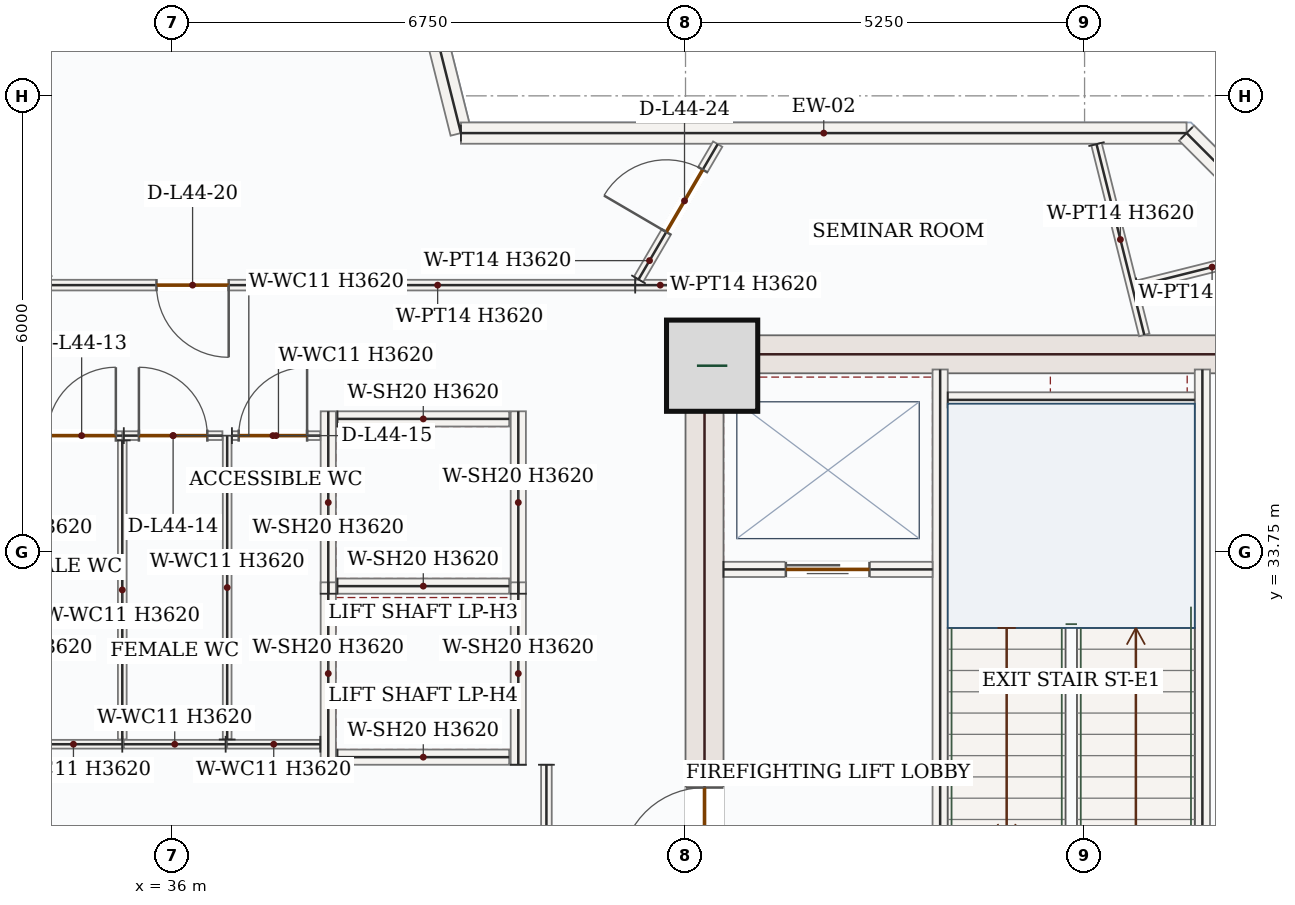
"""IFC4 building model, lengths in metres.
Left out: names, types, materials, properties, quantities, classifications, styles, units other than length and angle.
Written with IfcOpenShell. Run it as: python <this file> out.ifc"""

import sys

from ifc_helpers import new_model, si_unit, direction, frame, frame_2d, origin, origin_2d, place, context, subcontext, project, spatial, rectangle, extrude, source, transform, mapped, element, fill, save


model = new_model("IFC4")
c1 = context("Model", 3, precision=1e-05, world=origin(), true_north=direction((0.0, 1.0)))
c2 = subcontext(c1, "Body", "Model", "MODEL_VIEW")
j1 = project(units=[si_unit("LENGTHUNIT", "METRE"), si_unit("PLANEANGLEUNIT", "RADIAN")], contexts=[c1])
p1 = place(None, origin())
s1 = spatial("IfcSite", under=j1, at=p1, CompositionType="ELEMENT")
p2 = place(p1, origin())
s2 = spatial("IfcBuilding", under=s1, at=p2, CompositionType="ELEMENT")
p3 = place(p2, frame((0.0, 0.0, 190.2)))
s3 = spatial("IfcBuildingStorey", under=s2, at=p3, CompositionType="ELEMENT", Elevation=190.2)
p4 = place(p3, frame((43.0, 28.05, 0.0), z_axis=(0.0, 0.0, 1.0), x_axis=(0.0, 1.0, 0.0)))
e1 = element("IfcWall", 1, at=p4, inside=s3, PredefinedType="SHEAR", context=c2, shape_type="SweptSolid", body=[
    extrude(rectangle(XDim=8.55, YDim=0.5, at=frame_2d((4.275, 0.0))), origin(), (0.0, 0.0, 1.0), 3.62),
])
p5 = place(p4, frame((1.5, 0.0, 0.0)))
e2 = element("IfcOpeningElement", 2, at=p5, cuts=e1, PredefinedType="OPENING", context=c2, shape_type="SweptSolid", body=[
    extrude(rectangle(XDim=1.1, YDim=2.2, at=frame_2d((0.55, 1.1))), frame((0.0, 0.26, 0.0), z_axis=(0.0, -1.0, 0.0), x_axis=(1.0, 0.0, 0.0)), (0.0, 0.0, 1.0), 0.52),
])
m1 = source(origin(), c2, "Body", "SweptSolid", [
    extrude(rectangle(XDim=7.0, YDim=0.5, at=frame_2d((3.5, 0.0))), origin(), (0.0, 0.0, 1.0), 3.62),
])
p6 = place(p3, frame((43.25, 36.35, 0.0), z_axis=(0.0, 0.0, 1.0), x_axis=(1.0, 0.0, 0.0)))
e3 = element("IfcWall", 3, at=p6, inside=s3, PredefinedType="SHEAR", context=c2, shape_type="MappedRepresentation", body=[
    mapped(m1, transform((0.0, 0.0, 0.0), x_axis=(1.0, 0.0, 0.0), y_axis=(0.0, 1.0, 0.0), z_axis=(0.0, 0.0, 1.0), scale=1.0)),
])
m2 = source(origin(), c2, "Body", "SweptSolid", [
    extrude(rectangle(XDim=1.2, YDim=1.2, at=origin_2d()), origin(), (0.0, 0.0, 1.0), 3.9),
])
p7 = place(p3, frame((43.1, 36.2, 0.0), z_axis=(0.0, 0.0, 1.0), x_axis=(1.0, 0.0, 0.0)))
e4 = element("IfcColumn", 4, at=p7, inside=s3, PredefinedType="COLUMN", context=c2, shape_type="MappedRepresentation", body=[
    mapped(m2, transform((0.0, 0.0, 0.0), x_axis=(1.0, 0.0, 0.0), y_axis=(0.0, 1.0, 0.0), z_axis=(0.0, 0.0, 1.0), scale=1.0)),
])
m3 = source(origin(), c2, "Body", "SweptSolid", [
    extrude(rectangle(XDim=8.389, YDim=0.28, at=frame_2d((4.195, 0.0))), origin(), (0.0, 0.0, 1.0), 3.62),
])
p8 = place(p3, frame((37.757, 47.398, 0.0), z_axis=(0.0, 0.0, 1.0), x_axis=(0.242939601766, -0.970041416587, 0.0)))
e5 = element("IfcWall", 5, at=p8, inside=s3, PredefinedType="SOLIDWALL", context=c2, shape_type="MappedRepresentation", body=[
    mapped(m3, transform((0.0, 0.0, 0.0), x_axis=(1.0, 0.0, 0.0), y_axis=(0.0, 1.0, 0.0), z_axis=(0.0, 0.0, 1.0), scale=1.0)),
])
m4 = source(origin(), c2, "Body", "SweptSolid", [
    extrude(rectangle(XDim=9.547, YDim=0.28, at=frame_2d((4.773, 0.0))), origin(), (0.0, 0.0, 1.0), 3.62),
])
p9 = place(p3, frame((39.795, 39.26, 0.0), z_axis=(0.0, 0.0, 1.0), x_axis=(1.0, 0.0, 0.0)))
e6 = element("IfcWall", 6, at=p9, inside=s3, PredefinedType="SOLIDWALL", context=c2, shape_type="MappedRepresentation", body=[
    mapped(m4, transform((0.0, 0.0, 0.0), x_axis=(1.0, 0.0, 0.0), y_axis=(0.0, 1.0, 0.0), z_axis=(0.0, 0.0, 1.0), scale=1.0)),
])
m5 = source(origin(), c2, "Body", "SweptSolid", [
    extrude(rectangle(XDim=2.322, YDim=0.28, at=frame_2d((1.161, 0.0))), origin(), (0.0, 0.0, 1.0), 3.62),
])
p10 = place(p3, frame((49.342, 39.26, 0.0), z_axis=(0.0, 0.0, 1.0), x_axis=(0.707106781187, -0.707106781187, 0.0)))
e7 = element("IfcWall", 7, at=p10, inside=s3, PredefinedType="SOLIDWALL", context=c2, shape_type="MappedRepresentation", body=[
    mapped(m5, transform((0.0, 0.0, 0.0), x_axis=(1.0, 0.0, 0.0), y_axis=(0.0, 1.0, 0.0), z_axis=(0.0, 0.0, 1.0), scale=1.0)),
])
m6 = source(origin(), c2, "Body", "SweptSolid", [
    extrude(rectangle(XDim=7.87, YDim=0.2, at=frame_2d((3.935, 0.0))), origin(), (0.0, 0.0, 1.0), 3.62),
])
p11 = place(p3, frame((49.55, 28.28, 0.0), z_axis=(0.0, 0.0, 1.0), x_axis=(0.0, 1.0, 0.0)))
e8 = element("IfcWall", 8, at=p11, inside=s3, PredefinedType="SOLIDWALL", context=c2, shape_type="MappedRepresentation", body=[
    mapped(m6, transform((0.0, 0.0, 0.0), x_axis=(1.0, 0.0, 0.0), y_axis=(0.0, 1.0, 0.0), z_axis=(0.0, 0.0, 1.0), scale=1.0)),
])
p12 = place(p3, frame((46.1, 28.15, 0.0), z_axis=(0.0, 0.0, 1.0), x_axis=(0.0, 1.0, 0.0)))
e9 = element("IfcWall", 9, at=p12, inside=s3, PredefinedType="SOLIDWALL", context=c2, shape_type="SweptSolid", body=[
    extrude(rectangle(XDim=8.0, YDim=0.2, at=frame_2d((4.0, 0.0))), origin(), (0.0, 0.0, 1.0), 3.62),
])
p13 = place(p12, frame((0.4, 0.0, 0.0)))
e10 = element("IfcOpeningElement", 10, at=p13, cuts=e9, PredefinedType="OPENING", context=c2, shape_type="SweptSolid", body=[
    extrude(rectangle(XDim=1.05, YDim=2.15, at=frame_2d((0.525, 1.075))), frame((0.0, 0.11, 0.0), z_axis=(0.0, -1.0, 0.0), x_axis=(1.0, 0.0, 0.0)), (0.0, 0.0, 1.0), 0.22),
])
m7 = source(origin(), c2, "Body", "SweptSolid", [
    extrude(rectangle(XDim=3.25, YDim=0.2, at=frame_2d((1.625, 0.0))), origin(), (0.0, 0.0, 1.0), 3.62),
])
p14 = place(p3, frame((46.2, 35.75, 0.0), z_axis=(0.0, 0.0, 1.0), x_axis=(1.0, 0.0, 0.0)))
e11 = element("IfcWall", 11, at=p14, inside=s3, PredefinedType="SOLIDWALL", context=c2, shape_type="MappedRepresentation", body=[
    mapped(m7, transform((0.0, 0.0, 0.0), x_axis=(1.0, 0.0, 0.0), y_axis=(0.0, 1.0, 0.0), z_axis=(0.0, 0.0, 1.0), scale=1.0)),
])
p15 = place(p3, frame((43.25, 33.52, 0.0), z_axis=(0.0, 0.0, 1.0), x_axis=(1.0, 0.0, 0.0)))
e12 = element("IfcWall", 12, at=p15, inside=s3, PredefinedType="SOLIDWALL", context=c2, shape_type="SweptSolid", body=[
    extrude(rectangle(XDim=2.75, YDim=0.2, at=frame_2d((1.375, 0.0))), origin(), (0.0, 0.0, 1.0), 3.62),
])
p16 = place(p15, frame((0.82, 0.0, 0.0)))
e13 = element("IfcOpeningElement", 13, at=p16, cuts=e12, PredefinedType="OPENING", context=c2, shape_type="SweptSolid", body=[
    extrude(rectangle(XDim=1.1, YDim=2.15, at=frame_2d((0.55, 1.075))), frame((0.0, 0.11, 0.0), z_axis=(0.0, -1.0, 0.0), x_axis=(1.0, 0.0, 0.0)), (0.0, 0.0, 1.0), 0.22),
])
m8 = source(origin(), c2, "Body", "SweptSolid", [
    extrude(rectangle(XDim=2.4, YDim=0.2, at=frame_2d((1.2, 0.0))), origin(), (0.0, 0.0, 1.0), 3.62),
])
for number, where, z_axis, x_axis in (
    (14, (38.05, 33.2, 0.0), (0.0, 0.0, 1.0), (0.0, 1.0, 0.0)),
    (15, (40.55, 33.2, 0.0), (0.0, 0.0, 1.0), (0.0, 1.0, 0.0)),
):
    element("IfcWall", number, at=place(p3, frame(where, z_axis=z_axis, x_axis=x_axis)), inside=s3, PredefinedType="SOLIDWALL", context=c2, shape_type="MappedRepresentation", body=[
        mapped(m8, transform((0.0, 0.0, 0.0), x_axis=(1.0, 0.0, 0.0), y_axis=(0.0, 1.0, 0.0), z_axis=(0.0, 0.0, 1.0), scale=1.0)),
    ])
m9 = source(origin(), c2, "Body", "SweptSolid", [
    extrude(rectangle(XDim=2.26, YDim=0.2, at=frame_2d((1.13, 0.0))), origin(), (0.0, 0.0, 1.0), 3.62),
])
for number, where, z_axis, x_axis in (
    (16, (38.17, 33.3, 0.0), (0.0, 0.0, 1.0), (1.0, 0.0, 0.0)),
    (17, (38.17, 35.5, 0.0), (0.0, 0.0, 1.0), (1.0, 0.0, 0.0)),
):
    element("IfcWall", number, at=place(p3, frame(where, z_axis=z_axis, x_axis=x_axis)), inside=s3, PredefinedType="SOLIDWALL", context=c2, shape_type="MappedRepresentation", body=[
        mapped(m9, transform((0.0, 0.0, 0.0), x_axis=(1.0, 0.0, 0.0), y_axis=(0.0, 1.0, 0.0), z_axis=(0.0, 0.0, 1.0), scale=1.0)),
    ])
for number, where, z_axis, x_axis in (
    (18, (38.05, 30.95, 0.0), (0.0, 0.0, 1.0), (0.0, 1.0, 0.0)),
    (19, (40.55, 30.95, 0.0), (0.0, 0.0, 1.0), (0.0, 1.0, 0.0)),
):
    element("IfcWall", number, at=place(p3, frame(where, z_axis=z_axis, x_axis=x_axis)), inside=s3, PredefinedType="SOLIDWALL", context=c2, shape_type="MappedRepresentation", body=[
        mapped(m8, transform((0.0, 0.0, 0.0), x_axis=(1.0, 0.0, 0.0), y_axis=(0.0, 1.0, 0.0), z_axis=(0.0, 0.0, 1.0), scale=1.0)),
    ])
p17 = place(p3, frame((38.17, 31.05, 0.0), z_axis=(0.0, 0.0, 1.0), x_axis=(1.0, 0.0, 0.0)))
e20 = element("IfcWall", 20, at=p17, inside=s3, PredefinedType="SOLIDWALL", context=c2, shape_type="MappedRepresentation", body=[
    mapped(m9, transform((0.0, 0.0, 0.0), x_axis=(1.0, 0.0, 0.0), y_axis=(0.0, 1.0, 0.0), z_axis=(0.0, 0.0, 1.0), scale=1.0)),
])
m10 = source(origin(), c2, "Body", "SweptSolid", [
    extrude(rectangle(XDim=1.225, YDim=0.115, at=frame_2d((0.613, 0.0))), origin(), (0.0, 0.0, 1.0), 3.62),
])
p18 = place(p3, frame((37.945, 31.22, 0.0), z_axis=(0.0, 0.0, 1.0), x_axis=(-1.0, 0.0, 0.0)))
e21 = element("IfcWall", 21, at=p18, inside=s3, PredefinedType="PARTITIONING", context=c2, shape_type="MappedRepresentation", body=[
    mapped(m10, transform((0.0, 0.0, 0.0), x_axis=(1.0, 0.0, 0.0), y_axis=(0.0, 1.0, 0.0), z_axis=(0.0, 0.0, 1.0), scale=1.0)),
])
m11 = source(origin(), c2, "Body", "SweptSolid", [
    extrude(rectangle(XDim=3.998, YDim=0.115, at=frame_2d((1.999, 0.0))), origin(), (0.0, 0.0, 1.0), 3.62),
])
p19 = place(p3, frame((36.72, 31.282, 0.0), z_axis=(0.0, 0.0, 1.0), x_axis=(0.0, 1.0, 0.0)))
e22 = element("IfcWall", 22, at=p19, inside=s3, PredefinedType="PARTITIONING", context=c2, shape_type="MappedRepresentation", body=[
    mapped(m11, transform((0.0, 0.0, 0.0), x_axis=(1.0, 0.0, 0.0), y_axis=(0.0, 1.0, 0.0), z_axis=(0.0, 0.0, 1.0), scale=1.0)),
])
p20 = place(p3, frame((36.782, 35.28, 0.0), z_axis=(0.0, 0.0, 1.0), x_axis=(1.0, 0.0, 0.0)))
e23 = element("IfcWall", 23, at=p20, inside=s3, PredefinedType="PARTITIONING", context=c2, shape_type="SweptSolid", body=[
    extrude(rectangle(XDim=1.163, YDim=0.115, at=frame_2d((0.581, 0.0))), origin(), (0.0, 0.0, 1.0), 3.62),
])
p21 = place(p20, frame((0.089, 0.0, 0.0)))
e24 = element("IfcOpeningElement", 24, at=p21, cuts=e23, PredefinedType="OPENING", context=c2, shape_type="SweptSolid", body=[
    extrude(rectangle(XDim=0.9, YDim=2.1, at=frame_2d((0.45, 1.05))), frame((0.0, 0.067, 0.0), z_axis=(0.0, -1.0, 0.0), x_axis=(1.0, 0.0, 0.0)), (0.0, 0.0, 1.0), 0.135),
])
m12 = source(origin(), c2, "Body", "SweptSolid", [
    extrude(rectangle(XDim=1.285, YDim=0.115, at=frame_2d((0.643, 0.0))), origin(), (0.0, 0.0, 1.0), 3.62),
])
p22 = place(p3, frame((35.34, 31.22, 0.0), z_axis=(0.0, 0.0, 1.0), x_axis=(-1.0, 0.0, 0.0)))
e25 = element("IfcWall", 25, at=p22, inside=s3, PredefinedType="PARTITIONING", context=c2, shape_type="MappedRepresentation", body=[
    mapped(m12, transform((0.0, 0.0, 0.0), x_axis=(1.0, 0.0, 0.0), y_axis=(0.0, 1.0, 0.0), z_axis=(0.0, 0.0, 1.0), scale=1.0)),
])
p23 = place(p3, frame((34.055, 35.28, 0.0), z_axis=(0.0, 0.0, 1.0), x_axis=(1.0, 0.0, 0.0)))
e26 = element("IfcWall", 26, at=p23, inside=s3, PredefinedType="PARTITIONING", context=c2, shape_type="SweptSolid", body=[
    extrude(rectangle(XDim=1.285, YDim=0.115, at=frame_2d((0.643, 0.0))), origin(), (0.0, 0.0, 1.0), 3.62),
])
p24 = place(p23, frame((0.3, 0.0, 0.0)))
e27 = element("IfcOpeningElement", 27, at=p24, cuts=e26, PredefinedType="OPENING", context=c2, shape_type="SweptSolid", body=[
    extrude(rectangle(XDim=0.9, YDim=2.1, at=frame_2d((0.45, 1.05))), frame((0.0, 0.067, 0.0), z_axis=(0.0, -1.0, 0.0), x_axis=(1.0, 0.0, 0.0)), (0.0, 0.0, 1.0), 0.135),
])
m13 = source(origin(), c2, "Body", "SweptSolid", [
    extrude(rectangle(XDim=3.935, YDim=0.115, at=frame_2d((1.968, 0.0))), origin(), (0.0, 0.0, 1.0), 3.62),
])
p25 = place(p3, frame((35.34, 35.218, 0.0), z_axis=(0.0, 0.0, 1.0), x_axis=(0.0, -1.0, 0.0)))
e28 = element("IfcWall", 28, at=p25, inside=s3, PredefinedType="PARTITIONING", context=c2, shape_type="MappedRepresentation", body=[
    mapped(m13, transform((0.0, 0.0, 0.0), x_axis=(1.0, 0.0, 0.0), y_axis=(0.0, 1.0, 0.0), z_axis=(0.0, 0.0, 1.0), scale=1.0)),
])
m14 = source(origin(), c2, "Body", "SweptSolid", [
    extrude(rectangle(XDim=1.34, YDim=0.115, at=frame_2d((0.67, 0.0))), origin(), (0.0, 0.0, 1.0), 3.62),
])
p26 = place(p3, frame((36.7, 31.22, 0.0), z_axis=(0.0, 0.0, 1.0), x_axis=(-1.0, 0.0, 0.0)))
e29 = element("IfcWall", 29, at=p26, inside=s3, PredefinedType="PARTITIONING", context=c2, shape_type="MappedRepresentation", body=[
    mapped(m14, transform((0.0, 0.0, 0.0), x_axis=(1.0, 0.0, 0.0), y_axis=(0.0, 1.0, 0.0), z_axis=(0.0, 0.0, 1.0), scale=1.0)),
])
p27 = place(p3, frame((35.36, 35.28, 0.0), z_axis=(0.0, 0.0, 1.0), x_axis=(1.0, 0.0, 0.0)))
e30 = element("IfcWall", 30, at=p27, inside=s3, PredefinedType="PARTITIONING", context=c2, shape_type="SweptSolid", body=[
    extrude(rectangle(XDim=1.297, YDim=0.115, at=frame_2d((0.649, 0.0))), origin(), (0.0, 0.0, 1.0), 3.62),
])
p28 = place(p27, frame((0.199, 0.0, 0.0)))
e31 = element("IfcOpeningElement", 31, at=p28, cuts=e30, PredefinedType="OPENING", context=c2, shape_type="SweptSolid", body=[
    extrude(rectangle(XDim=0.9, YDim=2.1, at=frame_2d((0.45, 1.05))), frame((0.0, 0.067, 0.0), z_axis=(0.0, -1.0, 0.0), x_axis=(1.0, 0.0, 0.0)), (0.0, 0.0, 1.0), 0.135),
])
m15 = source(origin(), c2, "Body", "SweptSolid", [
    extrude(rectangle(XDim=0.66, YDim=0.14, at=frame_2d((0.33, 0.0))), origin(), (0.0, 0.0, 1.0), 3.62),
])
p29 = place(p3, frame((42.748, 37.259, 0.0), z_axis=(0.0, 0.0, 1.0), x_axis=(-0.99999938363, 0.001110287991, 0.0)))
e32 = element("IfcWall", 32, at=p29, inside=s3, PredefinedType="PARTITIONING", context=c2, shape_type="MappedRepresentation", body=[
    mapped(m15, transform((0.0, 0.0, 0.0), x_axis=(1.0, 0.0, 0.0), y_axis=(0.0, 1.0, 0.0), z_axis=(0.0, 0.0, 1.0), scale=1.0)),
])
p30 = place(p3, frame((42.132, 37.335, 0.0), z_axis=(0.0, 0.0, 1.0), x_axis=(0.505011455642, 0.863112640198, 0.0)))
e33 = element("IfcWall", 33, at=p30, inside=s3, PredefinedType="PARTITIONING", context=c2, shape_type="SweptSolid", body=[
    extrude(rectangle(XDim=2.062, YDim=0.14, at=frame_2d((1.031, 0.0))), origin(), (0.0, 0.0, 1.0), 3.62),
])
p31 = place(p30, frame((0.723, 0.0, 0.0)))
e34 = element("IfcOpeningElement", 34, at=p31, cuts=e33, PredefinedType="OPENING", context=c2, shape_type="SweptSolid", body=[
    extrude(rectangle(XDim=0.95, YDim=2.15, at=frame_2d((0.475, 1.075))), frame((0.0, 0.08, 0.0), z_axis=(0.0, -1.0, 0.0), x_axis=(1.0, 0.0, 0.0)), (0.0, 0.0, 1.0), 0.16),
])
m16 = source(origin(), c2, "Body", "SweptSolid", [
    extrude(rectangle(XDim=2.588, YDim=0.14, at=frame_2d((1.294, 0.0))), origin(), (0.0, 0.0, 1.0), 3.62),
])
p32 = place(p3, frame((48.157, 39.115, 0.0), z_axis=(0.0, 0.0, 1.0), x_axis=(0.242957412811, -0.97003695577, 0.0)))
e35 = element("IfcWall", 35, at=p32, inside=s3, PredefinedType="PARTITIONING", context=c2, shape_type="MappedRepresentation", body=[
    mapped(m16, transform((0.0, 0.0, 0.0), x_axis=(1.0, 0.0, 0.0), y_axis=(0.0, 1.0, 0.0), z_axis=(0.0, 0.0, 1.0), scale=1.0)),
])
m17 = source(origin(), c2, "Body", "SweptSolid", [
    extrude(rectangle(XDim=3.01, YDim=0.14, at=frame_2d((1.505, 0.0))), origin(), (0.0, 0.0, 1.0), 3.62),
])
p33 = place(p3, frame((40.92, 30.95, 0.0), z_axis=(0.0, 0.0, 1.0), x_axis=(0.0, -1.0, 0.0)))
e36 = element("IfcWall", 36, at=p33, inside=s3, PredefinedType="PARTITIONING", context=c2, shape_type="MappedRepresentation", body=[
    mapped(m17, transform((0.0, 0.0, 0.0), x_axis=(1.0, 0.0, 0.0), y_axis=(0.0, 1.0, 0.0), z_axis=(0.0, 0.0, 1.0), scale=1.0)),
])
m18 = source(origin(), c2, "Body", "SweptSolid", [
    extrude(rectangle(XDim=2.014, YDim=0.14, at=frame_2d((1.007, 0.0))), origin(), (0.0, 0.0, 1.0), 3.62),
])
p34 = place(p3, frame((48.701, 37.253, 0.0), z_axis=(0.0, 0.0, 1.0), x_axis=(0.970056889313, 0.242877811867, 0.0)))
e37 = element("IfcWall", 37, at=p34, inside=s3, PredefinedType="PARTITIONING", context=c2, shape_type="MappedRepresentation", body=[
    mapped(m18, transform((0.0, 0.0, 0.0), x_axis=(1.0, 0.0, 0.0), y_axis=(0.0, 1.0, 0.0), z_axis=(0.0, 0.0, 1.0), scale=1.0)),
])
p35 = place(p3, frame((42.088, 37.26, 0.0), z_axis=(0.0, 0.0, 1.0), x_axis=(-1.0, 0.0, 0.0)))
e38 = element("IfcWall", 38, at=p35, inside=s3, PredefinedType="PARTITIONING", context=c2, shape_type="SweptSolid", body=[
    extrude(rectangle(XDim=7.806, YDim=0.14, at=frame_2d((3.903, 0.0))), origin(), (0.0, 0.0, 1.0), 3.62),
])
p36 = place(p35, frame((5.348, 0.0, 0.0)))
e39 = element("IfcOpeningElement", 39, at=p36, cuts=e38, PredefinedType="OPENING", context=c2, shape_type="SweptSolid", body=[
    extrude(rectangle(XDim=0.95, YDim=2.15, at=frame_2d((0.475, 1.075))), frame((0.0, 0.08, 0.0), z_axis=(0.0, -1.0, 0.0), x_axis=(1.0, 0.0, 0.0)), (0.0, 0.0, 1.0), 0.16),
])
m19 = source(origin(), c2, "Body", "SweptSolid", [
    extrude(rectangle(XDim=1.1, YDim=2.15, at=frame_2d((0.55, 1.075))), frame((0.0, 0.025, 0.0), z_axis=(0.0, -1.0, 0.0), x_axis=(1.0, 0.0, 0.0)), (0.0, 0.0, 1.0), 0.05),
])
p37 = place(p16, origin())
e40 = element("IfcDoor", 40, at=p37, inside=s3, OperationType="DOUBLE_DOOR_SLIDING", PredefinedType="DOOR", context=c2, shape_type="MappedRepresentation", body=[
    mapped(m19, transform((0.0, 0.0, 0.0), x_axis=(1.0, 0.0, 0.0), y_axis=(0.0, 1.0, 0.0), z_axis=(0.0, 0.0, 1.0), scale=1.0)),
])
fill(e13, e40)
m20 = source(origin(), c2, "Body", "SweptSolid", [
    extrude(rectangle(XDim=1.1, YDim=2.2, at=frame_2d((0.55, 1.1))), frame((0.0, 0.025, 0.0), z_axis=(0.0, -1.0, 0.0), x_axis=(1.0, 0.0, 0.0)), (0.0, 0.0, 1.0), 0.05),
])
p38 = place(p5, origin())
e41 = element("IfcDoor", 41, at=p38, inside=s3, OperationType="SINGLE_SWING_LEFT", PredefinedType="DOOR", context=c2, shape_type="MappedRepresentation", body=[
    mapped(m20, transform((0.0, 0.0, 0.0), x_axis=(1.0, 0.0, 0.0), y_axis=(0.0, 1.0, 0.0), z_axis=(0.0, 0.0, 1.0), scale=1.0)),
])
fill(e2, e41)
m21 = source(origin(), c2, "Body", "SweptSolid", [
    extrude(rectangle(XDim=0.9, YDim=2.1, at=frame_2d((0.45, 1.05))), frame((0.0, 0.025, 0.0), z_axis=(0.0, -1.0, 0.0), x_axis=(1.0, 0.0, 0.0)), (0.0, 0.0, 1.0), 0.05),
])
p39 = place(p24, origin())
e42 = element("IfcDoor", 42, at=p39, inside=s3, OperationType="SINGLE_SWING_RIGHT", PredefinedType="DOOR", context=c2, shape_type="MappedRepresentation", body=[
    mapped(m21, transform((0.0, 0.0, 0.0), x_axis=(1.0, 0.0, 0.0), y_axis=(0.0, 1.0, 0.0), z_axis=(0.0, 0.0, 1.0), scale=1.0)),
])
fill(e27, e42)
p40 = place(p28, origin())
e43 = element("IfcDoor", 43, at=p40, inside=s3, OperationType="SINGLE_SWING_LEFT", PredefinedType="DOOR", context=c2, shape_type="MappedRepresentation", body=[
    mapped(m21, transform((0.0, 0.0, 0.0), x_axis=(1.0, 0.0, 0.0), y_axis=(0.0, 1.0, 0.0), z_axis=(0.0, 0.0, 1.0), scale=1.0)),
])
fill(e31, e43)
p41 = place(p21, origin())
e44 = element("IfcDoor", 44, at=p41, inside=s3, OperationType="SINGLE_SWING_RIGHT", PredefinedType="DOOR", context=c2, shape_type="MappedRepresentation", body=[
    mapped(m21, transform((0.0, 0.0, 0.0), x_axis=(1.0, 0.0, 0.0), y_axis=(0.0, 1.0, 0.0), z_axis=(0.0, 0.0, 1.0), scale=1.0)),
])
fill(e24, e44)
m22 = source(origin(), c2, "Body", "SweptSolid", [
    extrude(rectangle(XDim=0.95, YDim=2.15, at=frame_2d((0.475, 1.075))), frame((0.0, 0.025, 0.0), z_axis=(0.0, -1.0, 0.0), x_axis=(1.0, 0.0, 0.0)), (0.0, 0.0, 1.0), 0.05),
])
p42 = place(p36, origin())
e45 = element("IfcDoor", 45, at=p42, inside=s3, OperationType="SINGLE_SWING_LEFT", PredefinedType="DOOR", context=c2, shape_type="MappedRepresentation", body=[
    mapped(m22, transform((0.0, 0.0, 0.0), x_axis=(1.0, 0.0, 0.0), y_axis=(0.0, 1.0, 0.0), z_axis=(0.0, 0.0, 1.0), scale=1.0)),
])
fill(e39, e45)
p43 = place(p31, origin())
e46 = element("IfcDoor", 46, at=p43, inside=s3, OperationType="SINGLE_SWING_LEFT", PredefinedType="DOOR", context=c2, shape_type="MappedRepresentation", body=[
    mapped(m22, transform((0.0, 0.0, 0.0), x_axis=(1.0, 0.0, 0.0), y_axis=(0.0, 1.0, 0.0), z_axis=(0.0, 0.0, 1.0), scale=1.0)),
])
fill(e34, e46)
save(model, sys.argv[1])
